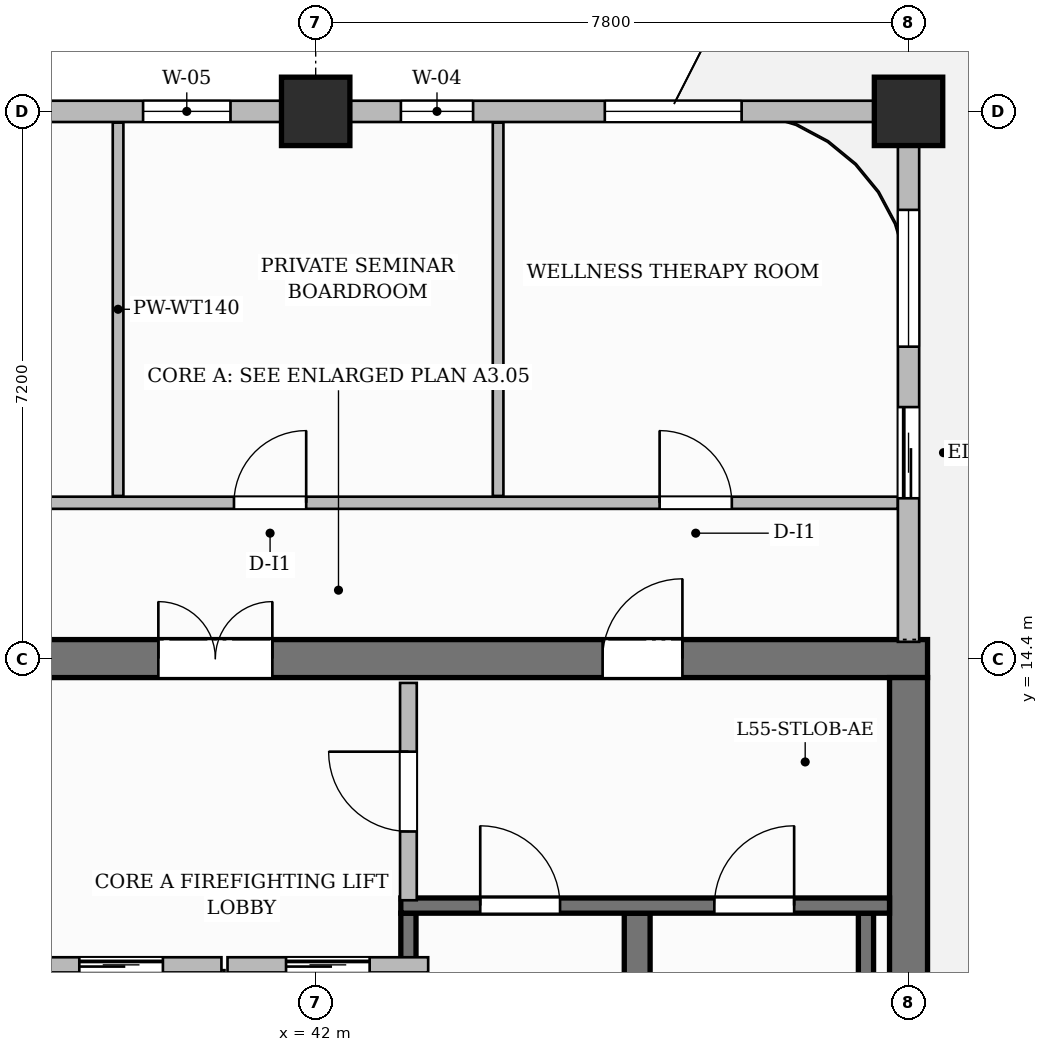
"""IFC4 building model, lengths in metres.
Left out: names, types, materials, properties, quantities, classifications, styles, units other than length and angle.
Written with IfcOpenShell. Run it as: python <this file> out.ifc"""

import sys

from ifc_helpers import new_model, si_unit, direction, frame, frame_2d, origin, origin_2d, place, context, subcontext, project, spatial, rectangle, extrude, source, transform, mapped, element, fill, save


model = new_model("IFC4")
c1 = context("Model", 3, precision=1e-05, world=origin(), true_north=direction((0.0, 1.0)))
c2 = subcontext(c1, "Body", "Model", "MODEL_VIEW")
j1 = project(units=[si_unit("LENGTHUNIT", "METRE"), si_unit("PLANEANGLEUNIT", "RADIAN")], contexts=[c1])
p1 = place(None, origin())
s1 = spatial("IfcSite", under=j1, at=p1, CompositionType="ELEMENT")
p2 = place(p1, origin())
s2 = spatial("IfcBuilding", under=s1, at=p2, CompositionType="ELEMENT")
p3 = place(p2, frame((0.0, 0.0, 221.15)))
s3 = spatial("IfcBuildingStorey", under=s2, at=p3, CompositionType="ELEMENT", Elevation=221.15)
p4 = place(p3, frame((34.55, 14.4, 0.0), z_axis=(0.0, 0.0, 1.0), x_axis=(1.0, 0.0, 0.0)))
e1 = element("IfcWall", 1, at=p4, inside=s3, PredefinedType="SHEAR", context=c2, shape_type="SweptSolid", body=[
    extrude(rectangle(XDim=15.5, YDim=0.5, at=frame_2d((7.75, 0.0))), origin(), (0.0, 0.0, 1.0), 3.85),
])
p5 = place(p4, frame((5.38, 0.0, 0.0)))
e2 = element("IfcOpeningElement", 2, at=p5, cuts=e1, PredefinedType="OPENING", context=c2, shape_type="SweptSolid", body=[
    extrude(rectangle(XDim=1.5, YDim=2.2, at=frame_2d((0.75, 1.1))), frame((0.0, 0.26, 0.0), z_axis=(0.0, -1.0, 0.0), x_axis=(1.0, 0.0, 0.0)), (0.0, 0.0, 1.0), 0.52),
])
p6 = place(p4, frame((1.595, 0.0, 0.0)))
e3 = element("IfcOpeningElement", 3, at=p6, cuts=e1, PredefinedType="OPENING", context=c2, shape_type="SweptSolid", body=[
    extrude(rectangle(XDim=1.05, YDim=2.15, at=frame_2d((0.525, 1.075))), frame((0.0, 0.26, 0.0), z_axis=(0.0, -1.0, 0.0), x_axis=(1.0, 0.0, 0.0)), (0.0, 0.0, 1.0), 0.52),
])
p7 = place(p4, frame((11.225, 0.0, 0.0)))
e4 = element("IfcOpeningElement", 4, at=p7, cuts=e1, PredefinedType="OPENING", context=c2, shape_type="SweptSolid", body=[
    extrude(rectangle(XDim=1.05, YDim=2.15, at=frame_2d((0.525, 1.075))), frame((0.0, 0.26, 0.0), z_axis=(0.0, -1.0, 0.0), x_axis=(1.0, 0.0, 0.0)), (0.0, 0.0, 1.0), 0.52),
])
p8 = place(p3, frame((49.8, 3.85, 0.0), z_axis=(0.0, 0.0, 1.0), x_axis=(0.0, 1.0, 0.0)))
e5 = element("IfcWall", 5, at=p8, inside=s3, PredefinedType="SHEAR", context=c2, shape_type="SweptSolid", body=[
    extrude(rectangle(XDim=10.3, YDim=0.5, at=frame_2d((5.15, 0.0))), origin(), (0.0, 0.0, 1.0), 3.85),
])
m1 = source(origin(), c2, "Body", "SweptSolid", [
    extrude(rectangle(XDim=0.9, YDim=0.9, at=origin_2d()), origin(), (0.0, 0.0, 1.0), 3.85),
])
for number, where, z_axis, x_axis in (
    (6, (42.0, 21.6, 0.0), (0.0, 0.0, 1.0), (1.0, 0.0, 0.0)),
    (7, (49.8, 21.6, 0.0), (0.0, 0.0, 1.0), (1.0, 0.0, 0.0)),
):
    element("IfcColumn", number, at=place(p3, frame(where, z_axis=z_axis, x_axis=x_axis)), inside=s3, PredefinedType="COLUMN", context=c2, shape_type="MappedRepresentation", body=[
        mapped(m1, transform((0.0, 0.0, 0.0), scale=1.0)),
    ])
p9 = place(p3, frame((43.22, 4.1, 0.0), z_axis=(0.0, 0.0, 1.0), x_axis=(0.0, 1.0, 0.0)))
e8 = element("IfcWall", 8, at=p9, inside=s3, PredefinedType="SHEAR", context=c2, shape_type="SweptSolid", body=[
    extrude(rectangle(XDim=6.95, YDim=0.2, at=frame_2d((3.475, 0.0))), origin(), (0.0, 0.0, 1.0), 3.85),
])
p10 = place(p3, frame((46.23, 4.1, 0.0), z_axis=(0.0, 0.0, 1.0), x_axis=(0.0, 1.0, 0.0)))
e9 = element("IfcWall", 9, at=p10, inside=s3, PredefinedType="SHEAR", context=c2, shape_type="SweptSolid", body=[
    extrude(rectangle(XDim=6.95, YDim=0.34, at=frame_2d((3.475, 0.0))), origin(), (0.0, 0.0, 1.0), 3.85),
])
p11 = place(p3, frame((49.24, 4.1, 0.0), z_axis=(0.0, 0.0, 1.0), x_axis=(0.0, 1.0, 0.0)))
e10 = element("IfcWall", 10, at=p11, inside=s3, PredefinedType="SHEAR", context=c2, shape_type="SweptSolid", body=[
    extrude(rectangle(XDim=6.95, YDim=0.2, at=frame_2d((3.475, 0.0))), origin(), (0.0, 0.0, 1.0), 3.85),
])
p12 = place(p3, frame((43.12, 11.15, 0.0), z_axis=(0.0, 0.0, 1.0), x_axis=(1.0, 0.0, 0.0)))
e11 = element("IfcWall", 11, at=p12, inside=s3, PredefinedType="SHEAR", context=c2, shape_type="SweptSolid", body=[
    extrude(rectangle(XDim=6.43, YDim=0.2, at=frame_2d((3.215, 0.0))), origin(), (0.0, 0.0, 1.0), 3.85),
])
p13 = place(p12, frame((1.045, 0.0, 0.0)))
e12 = element("IfcOpeningElement", 12, at=p13, cuts=e11, PredefinedType="OPENING", context=c2, shape_type="SweptSolid", body=[
    extrude(rectangle(XDim=1.05, YDim=2.2, at=frame_2d((0.525, 1.1))), frame((0.0, 0.11, 0.0), z_axis=(0.0, -1.0, 0.0), x_axis=(1.0, 0.0, 0.0)), (0.0, 0.0, 1.0), 0.22),
])
p14 = place(p12, frame((4.125, 0.0, 0.0)))
e13 = element("IfcOpeningElement", 13, at=p14, cuts=e11, PredefinedType="OPENING", context=c2, shape_type="SweptSolid", body=[
    extrude(rectangle(XDim=1.05, YDim=2.2, at=frame_2d((0.525, 1.1))), frame((0.0, 0.11, 0.0), z_axis=(0.0, -1.0, 0.0), x_axis=(1.0, 0.0, 0.0)), (0.0, 0.0, 1.0), 0.22),
])
p15 = place(p3, frame((40.7, 8.12, 0.0), z_axis=(0.0, 0.0, 1.0), x_axis=(0.0, 1.0, 0.0)))
e14 = element("IfcWall", 14, at=p15, inside=s3, PredefinedType="PARTITIONING", context=c2, shape_type="SweptSolid", body=[
    extrude(rectangle(XDim=2.18, YDim=0.2, at=frame_2d((1.09, 0.0))), origin(), (0.0, 0.0, 1.0), 3.6),
])
p16 = place(p3, frame((43.22, 11.22, 0.0), z_axis=(0.0, 0.0, 1.0), x_axis=(0.0, 1.0, 0.0)))
e15 = element("IfcWall", 15, at=p16, inside=s3, PredefinedType="PARTITIONING", context=c2, shape_type="SweptSolid", body=[
    extrude(rectangle(XDim=2.86, YDim=0.22, at=frame_2d((1.43, 0.0))), origin(), (0.0, 0.0, 1.0), 3.6),
])
p17 = place(p16, frame((0.905, 0.0, 0.0)))
e16 = element("IfcOpeningElement", 16, at=p17, cuts=e15, PredefinedType="OPENING", context=c2, shape_type="SweptSolid", body=[
    extrude(rectangle(XDim=1.05, YDim=2.15, at=frame_2d((0.525, 1.075))), frame((0.0, 0.12, 0.0), z_axis=(0.0, -1.0, 0.0), x_axis=(1.0, 0.0, 0.0)), (0.0, 0.0, 1.0), 0.24),
])
p18 = place(p3, frame((30.29, 16.45, 0.0), z_axis=(0.0, 0.0, 1.0), x_axis=(1.0, 0.0, 0.0)))
e17 = element("IfcWall", 17, at=p18, inside=s3, PredefinedType="PARTITIONING", context=c2, shape_type="SweptSolid", body=[
    extrude(rectangle(XDim=19.37, YDim=0.16, at=frame_2d((9.685, 0.0))), origin(), (0.0, 0.0, 1.0), 3.6),
])
p19 = place(p18, frame((1.135, 0.0, 0.0)))
e18 = element("IfcOpeningElement", 18, at=p19, cuts=e17, PredefinedType="OPENING", context=c2, shape_type="SweptSolid", body=[
    extrude(rectangle(XDim=0.85, YDim=2.1, at=frame_2d((0.425, 1.05))), frame((0.0, 0.09, 0.0), z_axis=(0.0, -1.0, 0.0), x_axis=(1.0, 0.0, 0.0)), (0.0, 0.0, 1.0), 0.18),
])
p20 = place(p18, frame((5.71, 0.0, 0.0)))
e19 = element("IfcOpeningElement", 19, at=p20, cuts=e17, PredefinedType="OPENING", context=c2, shape_type="SweptSolid", body=[
    extrude(rectangle(XDim=0.9, YDim=2.15, at=frame_2d((0.45, 1.075))), frame((0.0, 0.09, 0.0), z_axis=(0.0, -1.0, 0.0), x_axis=(1.0, 0.0, 0.0)), (0.0, 0.0, 1.0), 0.18),
])
p21 = place(p18, frame((10.635, 0.0, 0.0)))
e20 = element("IfcOpeningElement", 20, at=p21, cuts=e17, PredefinedType="OPENING", context=c2, shape_type="SweptSolid", body=[
    extrude(rectangle(XDim=0.95, YDim=2.15, at=frame_2d((0.475, 1.075))), frame((0.0, 0.09, 0.0), z_axis=(0.0, -1.0, 0.0), x_axis=(1.0, 0.0, 0.0)), (0.0, 0.0, 1.0), 0.18),
])
p22 = place(p18, frame((16.235, 0.0, 0.0)))
e21 = element("IfcOpeningElement", 21, at=p22, cuts=e17, PredefinedType="OPENING", context=c2, shape_type="SweptSolid", body=[
    extrude(rectangle(XDim=0.95, YDim=2.15, at=frame_2d((0.475, 1.075))), frame((0.0, 0.09, 0.0), z_axis=(0.0, -1.0, 0.0), x_axis=(1.0, 0.0, 0.0)), (0.0, 0.0, 1.0), 0.18),
])
for number, where, z_axis, x_axis in (
    (22, (39.4, 16.54, 0.0), (0.0, 0.0, 1.0), (0.0, 1.0, 0.0)),
    (23, (44.4, 16.54, 0.0), (0.0, 0.0, 1.0), (0.0, 1.0, 0.0)),
):
    element("IfcWall", number, at=place(p3, frame(where, z_axis=z_axis, x_axis=x_axis)), inside=s3, PredefinedType="PARTITIONING", context=c2, shape_type="SweptSolid", body=[
        extrude(rectangle(XDim=4.912, YDim=0.14, at=frame_2d((2.456, 0.0))), origin(), (0.0, 0.0, 1.0), 3.6),
    ])
p23 = place(p3, frame((38.12, 10.37, 0.0), z_axis=(0.0, 0.0, 1.0), x_axis=(1.0, 0.0, 0.0)))
e24 = element("IfcWall", 24, at=p23, inside=s3, PredefinedType="PARTITIONING", context=c2, shape_type="SweptSolid", body=[
    extrude(rectangle(XDim=2.64, YDim=0.2, at=frame_2d((1.32, 0.0))), origin(), (0.0, 0.0, 1.0), 3.6),
])
p24 = place(p23, frame((0.77, 0.0, 0.0)))
e25 = element("IfcOpeningElement", 25, at=p24, cuts=e24, PredefinedType="OPENING", context=c2, shape_type="SweptSolid", body=[
    extrude(rectangle(XDim=1.1, YDim=2.2, at=frame_2d((0.55, 1.1))), frame((0.0, 0.11, 0.0), z_axis=(0.0, -1.0, 0.0), x_axis=(1.0, 0.0, 0.0)), (0.0, 0.0, 1.0), 0.22),
])
p25 = place(p3, frame((40.84, 10.37, 0.0), z_axis=(0.0, 0.0, 1.0), x_axis=(1.0, 0.0, 0.0)))
e26 = element("IfcWall", 26, at=p25, inside=s3, PredefinedType="PARTITIONING", context=c2, shape_type="SweptSolid", body=[
    extrude(rectangle(XDim=2.64, YDim=0.2, at=frame_2d((1.32, 0.0))), origin(), (0.0, 0.0, 1.0), 3.6),
])
p26 = place(p25, frame((0.77, 0.0, 0.0)))
e27 = element("IfcOpeningElement", 27, at=p26, cuts=e26, PredefinedType="OPENING", context=c2, shape_type="SweptSolid", body=[
    extrude(rectangle(XDim=1.1, YDim=2.2, at=frame_2d((0.55, 1.1))), frame((0.0, 0.11, 0.0), z_axis=(0.0, -1.0, 0.0), x_axis=(1.0, 0.0, 0.0)), (0.0, 0.0, 1.0), 0.22),
])
p27 = place(p3, frame((49.8, 14.62, 0.0), z_axis=(0.0, 0.0, 1.0), x_axis=(0.0, 1.0, 0.0)))
e28 = element("IfcWall", 28, at=p27, inside=s3, PredefinedType="SOLIDWALL", context=c2, shape_type="SweptSolid", body=[
    extrude(rectangle(XDim=6.93, YDim=0.28, at=frame_2d((3.465, 0.0))), origin(), (0.0, 0.0, 1.0), 3.135),
])
p28 = place(p27, frame((1.889, 0.0, 0.0)))
e29 = element("IfcOpeningElement", 29, at=p28, cuts=e28, PredefinedType="OPENING", context=c2, shape_type="SweptSolid", body=[
    extrude(rectangle(XDim=1.2, YDim=2.2, at=frame_2d((0.6, 1.1))), frame((0.0, 0.15, 0.0), z_axis=(0.0, -1.0, 0.0), x_axis=(1.0, 0.0, 0.0)), (0.0, 0.0, 1.0), 0.3),
])
p29 = place(p27, frame((3.884, 0.0, 0.8)))
e30 = element("IfcOpeningElement", 30, at=p29, cuts=e28, PredefinedType="OPENING", context=c2, shape_type="SweptSolid", body=[
    extrude(rectangle(XDim=1.8, YDim=1.85, at=frame_2d((0.9, 0.925))), frame((0.0, 0.15, 0.0), z_axis=(0.0, -1.0, 0.0), x_axis=(1.0, 0.0, 0.0)), (0.0, 0.0, 1.0), 0.3),
])
p30 = place(p3, frame((14.4, 21.6, 0.0), z_axis=(0.0, 0.0, 1.0), x_axis=(1.0, 0.0, 0.0)))
e31 = element("IfcWall", 31, at=p30, inside=s3, PredefinedType="SOLIDWALL", context=c2, shape_type="SweptSolid", body=[
    extrude(rectangle(XDim=35.4, YDim=0.28, at=frame_2d((17.7, 0.0))), origin(), (0.0, 0.0, 1.0), 3.135),
])
p31 = place(p30, frame((0.85, 0.0, 0.0)))
e32 = element("IfcOpeningElement", 32, at=p31, cuts=e31, PredefinedType="OPENING", context=c2, shape_type="SweptSolid", body=[
    extrude(rectangle(XDim=1.2, YDim=2.2, at=frame_2d((0.6, 1.1))), frame((0.0, 0.15, 0.0), z_axis=(0.0, -1.0, 0.0), x_axis=(1.0, 0.0, 0.0)), (0.0, 0.0, 1.0), 0.3),
])
p32 = place(p30, frame((3.679, 0.0, 0.8)))
e33 = element("IfcOpeningElement", 33, at=p32, cuts=e31, PredefinedType="OPENING", context=c2, shape_type="SweptSolid", body=[
    extrude(rectangle(XDim=1.8, YDim=1.85, at=frame_2d((0.9, 0.925))), frame((0.0, 0.15, 0.0), z_axis=(0.0, -1.0, 0.0), x_axis=(1.0, 0.0, 0.0)), (0.0, 0.0, 1.0), 0.3),
])
p33 = place(p30, frame((8.181, 0.0, 0.8)))
e34 = element("IfcOpeningElement", 34, at=p33, cuts=e31, PredefinedType="OPENING", context=c2, shape_type="SweptSolid", body=[
    extrude(rectangle(XDim=0.95, YDim=1.75, at=frame_2d((0.475, 0.875))), frame((0.0, 0.15, 0.0), z_axis=(0.0, -1.0, 0.0), x_axis=(1.0, 0.0, 0.0)), (0.0, 0.0, 1.0), 0.3),
])
p34 = place(p30, frame((10.564, 0.0, 0.8)))
e35 = element("IfcOpeningElement", 35, at=p34, cuts=e31, PredefinedType="OPENING", context=c2, shape_type="SweptSolid", body=[
    extrude(rectangle(XDim=1.8, YDim=1.85, at=frame_2d((0.9, 0.925))), frame((0.0, 0.15, 0.0), z_axis=(0.0, -1.0, 0.0), x_axis=(1.0, 0.0, 0.0)), (0.0, 0.0, 1.0), 0.3),
])
p35 = place(p30, frame((16.551, 0.0, 0.8)))
e36 = element("IfcOpeningElement", 36, at=p35, cuts=e31, PredefinedType="OPENING", context=c2, shape_type="SweptSolid", body=[
    extrude(rectangle(XDim=1.8, YDim=1.85, at=frame_2d((0.9, 0.925))), frame((0.0, 0.15, 0.0), z_axis=(0.0, -1.0, 0.0), x_axis=(1.0, 0.0, 0.0)), (0.0, 0.0, 1.0), 0.3),
])
p36 = place(p30, frame((22.196, 0.0, 0.8)))
e37 = element("IfcOpeningElement", 37, at=p36, cuts=e31, PredefinedType="OPENING", context=c2, shape_type="SweptSolid", body=[
    extrude(rectangle(XDim=1.8, YDim=1.85, at=frame_2d((0.9, 0.925))), frame((0.0, 0.15, 0.0), z_axis=(0.0, -1.0, 0.0), x_axis=(1.0, 0.0, 0.0)), (0.0, 0.0, 1.0), 0.3),
])
p37 = place(p30, frame((25.329, 0.0, 0.8)))
e38 = element("IfcOpeningElement", 38, at=p37, cuts=e31, PredefinedType="OPENING", context=c2, shape_type="SweptSolid", body=[
    extrude(rectangle(XDim=1.15, YDim=1.8, at=frame_2d((0.575, 0.9))), frame((0.0, 0.15, 0.0), z_axis=(0.0, -1.0, 0.0), x_axis=(1.0, 0.0, 0.0)), (0.0, 0.0, 1.0), 0.3),
])
p38 = place(p30, frame((28.721, 0.0, 0.8)))
e39 = element("IfcOpeningElement", 39, at=p38, cuts=e31, PredefinedType="OPENING", context=c2, shape_type="SweptSolid", body=[
    extrude(rectangle(XDim=0.95, YDim=1.75, at=frame_2d((0.475, 0.875))), frame((0.0, 0.15, 0.0), z_axis=(0.0, -1.0, 0.0), x_axis=(1.0, 0.0, 0.0)), (0.0, 0.0, 1.0), 0.3),
])
p39 = place(p30, frame((31.404, 0.0, 0.8)))
e40 = element("IfcOpeningElement", 40, at=p39, cuts=e31, PredefinedType="OPENING", context=c2, shape_type="SweptSolid", body=[
    extrude(rectangle(XDim=1.8, YDim=1.85, at=frame_2d((0.9, 0.925))), frame((0.0, 0.15, 0.0), z_axis=(0.0, -1.0, 0.0), x_axis=(1.0, 0.0, 0.0)), (0.0, 0.0, 1.0), 0.3),
])
m2 = source(origin(), c2, "Body", "SweptSolid", [
    extrude(rectangle(XDim=1.05, YDim=2.2, at=frame_2d((0.525, 1.1))), frame((0.0, 0.025, 0.0), z_axis=(0.0, -1.0, 0.0), x_axis=(1.0, 0.0, 0.0)), (0.0, 0.0, 1.0), 0.05),
])
p40 = place(p13, origin())
e41 = element("IfcDoor", 41, at=p40, inside=s3, OperationType="SINGLE_SWING_LEFT", PredefinedType="DOOR", context=c2, shape_type="MappedRepresentation", body=[
    mapped(m2, transform((0.0, 0.0, 0.0), scale=1.0)),
])
fill(e12, e41)
p41 = place(p14, origin())
e42 = element("IfcDoor", 42, at=p41, inside=s3, OperationType="SINGLE_SWING_RIGHT", PredefinedType="DOOR", context=c2, shape_type="MappedRepresentation", body=[
    mapped(m2, transform((0.0, 0.0, 0.0), scale=1.0)),
])
fill(e13, e42)
m3 = source(origin(), c2, "Body", "SweptSolid", [
    extrude(rectangle(XDim=1.05, YDim=2.15, at=frame_2d((0.525, 1.075))), frame((0.0, 0.025, 0.0), z_axis=(0.0, -1.0, 0.0), x_axis=(1.0, 0.0, 0.0)), (0.0, 0.0, 1.0), 0.05),
])
p42 = place(p17, origin())
e43 = element("IfcDoor", 43, at=p42, inside=s3, OperationType="SINGLE_SWING_RIGHT", PredefinedType="DOOR", context=c2, shape_type="MappedRepresentation", body=[
    mapped(m3, transform((0.0, 0.0, 0.0), scale=1.0)),
])
fill(e16, e43)
m4 = source(origin(), c2, "Body", "SweptSolid", [
    extrude(rectangle(XDim=1.5, YDim=2.2, at=frame_2d((0.75, 1.1))), frame((0.0, 0.025, 0.0), z_axis=(0.0, -1.0, 0.0), x_axis=(1.0, 0.0, 0.0)), (0.0, 0.0, 1.0), 0.05),
])
p43 = place(p5, origin())
e44 = element("IfcDoor", 44, at=p43, inside=s3, OperationType="DOUBLE_DOOR_SINGLE_SWING", PredefinedType="DOOR", context=c2, shape_type="MappedRepresentation", body=[
    mapped(m4, transform((0.0, 0.0, 0.0), scale=1.0)),
])
fill(e2, e44)
p44 = place(p7, origin())
e45 = element("IfcDoor", 45, at=p44, inside=s3, OperationType="SINGLE_SWING_RIGHT", PredefinedType="DOOR", context=c2, shape_type="MappedRepresentation", body=[
    mapped(m3, transform((0.0, 0.0, 0.0), scale=1.0)),
])
fill(e4, e45)
m5 = source(origin(), c2, "Body", "SweptSolid", [
    extrude(rectangle(XDim=0.95, YDim=2.15, at=frame_2d((0.475, 1.075))), frame((0.0, 0.025, 0.0), z_axis=(0.0, -1.0, 0.0), x_axis=(1.0, 0.0, 0.0)), (0.0, 0.0, 1.0), 0.05),
])
p45 = place(p21, origin())
e46 = element("IfcDoor", 46, at=p45, inside=s3, OperationType="SINGLE_SWING_RIGHT", PredefinedType="DOOR", context=c2, shape_type="MappedRepresentation", body=[
    mapped(m5, transform((0.0, 0.0, 0.0), scale=1.0)),
])
fill(e20, e46)
p46 = place(p22, origin())
e47 = element("IfcDoor", 47, at=p46, inside=s3, OperationType="SINGLE_SWING_LEFT", PredefinedType="DOOR", context=c2, shape_type="MappedRepresentation", body=[
    mapped(m5, transform((0.0, 0.0, 0.0), scale=1.0)),
])
fill(e21, e47)
m6 = source(origin(), c2, "Body", "SweptSolid", [
    extrude(rectangle(XDim=1.1, YDim=2.2, at=frame_2d((0.55, 1.1))), frame((0.0, 0.025, 0.0), z_axis=(0.0, -1.0, 0.0), x_axis=(1.0, 0.0, 0.0)), (0.0, 0.0, 1.0), 0.05),
])
p47 = place(p24, origin())
e48 = element("IfcDoor", 48, at=p47, inside=s3, OperationType="SLIDING_TO_LEFT", PredefinedType="DOOR", context=c2, shape_type="MappedRepresentation", body=[
    mapped(m6, transform((0.0, 0.0, 0.0), scale=1.0)),
])
fill(e25, e48)
p48 = place(p26, origin())
e49 = element("IfcDoor", 49, at=p48, inside=s3, OperationType="SLIDING_TO_LEFT", PredefinedType="DOOR", context=c2, shape_type="MappedRepresentation", body=[
    mapped(m6, transform((0.0, 0.0, 0.0), scale=1.0)),
])
fill(e27, e49)
m7 = source(origin(), c2, "Body", "SweptSolid", [
    extrude(rectangle(XDim=1.2, YDim=2.2, at=frame_2d((0.6, 1.1))), frame((0.0, 0.025, 0.0), z_axis=(0.0, -1.0, 0.0), x_axis=(1.0, 0.0, 0.0)), (0.0, 0.0, 1.0), 0.05),
])
p49 = place(p28, origin())
e50 = element("IfcDoor", 50, at=p49, inside=s3, OperationType="SLIDING_TO_LEFT", PredefinedType="DOOR", context=c2, shape_type="MappedRepresentation", body=[
    mapped(m7, transform((0.0, 0.0, 0.0), scale=1.0)),
])
fill(e29, e50)
m8 = source(origin(), c2, "Body", "SweptSolid", [
    extrude(rectangle(XDim=1.8, YDim=1.85, at=frame_2d((0.9, 0.925))), frame((0.0, 0.03, 0.0), z_axis=(0.0, -1.0, 0.0), x_axis=(1.0, 0.0, 0.0)), (0.0, 0.0, 1.0), 0.06),
])
p50 = place(p29, origin())
e51 = element("IfcWindow", 51, at=p50, inside=s3, PartitioningType="DOUBLE_PANEL_VERTICAL", PredefinedType="WINDOW", context=c2, shape_type="MappedRepresentation", body=[
    mapped(m8, transform((0.0, 0.0, 0.0), scale=1.0)),
])
fill(e30, e51)
m9 = source(origin(), c2, "Body", "SweptSolid", [
    extrude(rectangle(XDim=1.15, YDim=1.8, at=frame_2d((0.575, 0.9))), frame((0.0, 0.03, 0.0), z_axis=(0.0, -1.0, 0.0), x_axis=(1.0, 0.0, 0.0)), (0.0, 0.0, 1.0), 0.06),
])
p51 = place(p37, origin())
e52 = element("IfcWindow", 52, at=p51, inside=s3, PartitioningType="SINGLE_PANEL", PredefinedType="WINDOW", context=c2, shape_type="MappedRepresentation", body=[
    mapped(m9, transform((0.0, 0.0, 0.0), scale=1.0)),
])
fill(e38, e52)
m10 = source(origin(), c2, "Body", "SweptSolid", [
    extrude(rectangle(XDim=0.95, YDim=1.75, at=frame_2d((0.475, 0.875))), frame((0.0, 0.03, 0.0), z_axis=(0.0, -1.0, 0.0), x_axis=(1.0, 0.0, 0.0)), (0.0, 0.0, 1.0), 0.06),
])
p52 = place(p38, origin())
e53 = element("IfcWindow", 53, at=p52, inside=s3, PartitioningType="SINGLE_PANEL", PredefinedType="WINDOW", context=c2, shape_type="MappedRepresentation", body=[
    mapped(m10, transform((0.0, 0.0, 0.0), scale=1.0)),
])
fill(e39, e53)
p53 = place(p39, origin())
e54 = element("IfcWindow", 54, at=p53, inside=s3, PartitioningType="DOUBLE_PANEL_VERTICAL", PredefinedType="WINDOW", context=c2, shape_type="MappedRepresentation", body=[
    mapped(m8, transform((0.0, 0.0, 0.0), scale=1.0)),
])
fill(e40, e54)
save(model, sys.argv[1])
